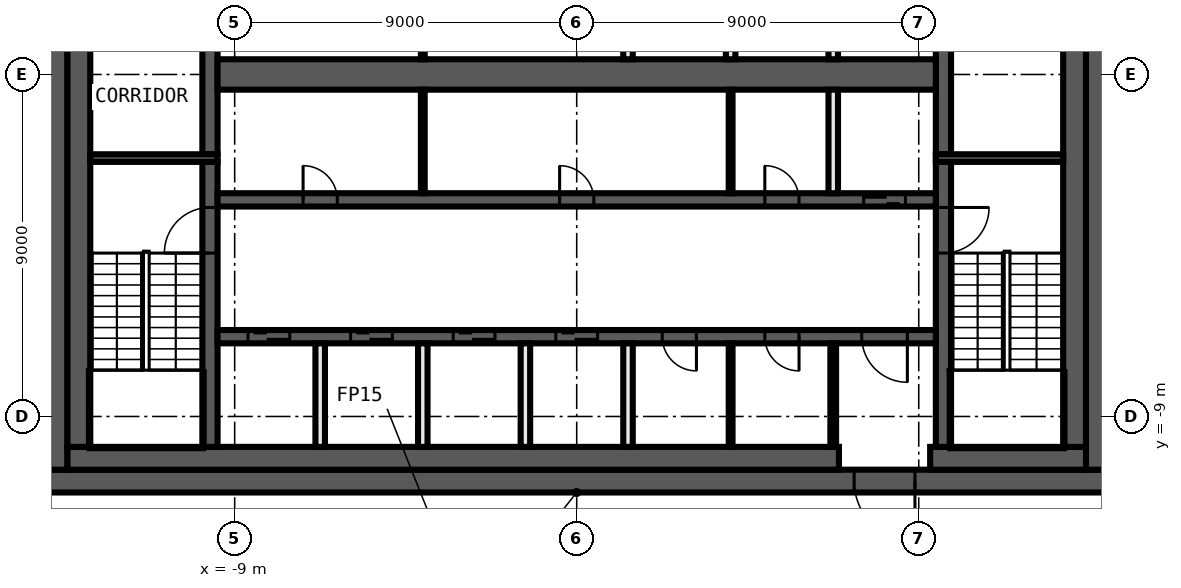
"""IFC4 building model, lengths in metres.
Left out: names, types, materials, properties, quantities, classifications, styles, units other than length and angle.
Written with IfcOpenShell. Run it as: python <this file> out.ifc"""

import sys

from ifc_helpers import new_model, si_unit, direction, frame, frame_2d, origin, place, context, subcontext, project, spatial, rectangle, extrude, element, fill, save


model = new_model("IFC4")
c1 = context("Model", 3, precision=1e-05, world=origin(), true_north=direction((0.0, 1.0)))
c2 = subcontext(c1, "Body", "Model", "MODEL_VIEW")
j1 = project(units=[si_unit("LENGTHUNIT", "METRE"), si_unit("PLANEANGLEUNIT", "RADIAN")], contexts=[c1])
p1 = place(None, origin())
s1 = spatial("IfcSite", under=j1, at=p1, CompositionType="ELEMENT")
p2 = place(p1, origin())
s2 = spatial("IfcBuilding", under=s1, at=p2, CompositionType="ELEMENT")
p3 = place(p2, frame((0.0, 0.0, 348.8)))
s3 = spatial("IfcBuildingStorey", under=s2, at=p3, CompositionType="ELEMENT", Elevation=348.8)
p4 = place(p3, frame((14.0, -10.7, 0.0), z_axis=(0.0, 0.0, 1.0), x_axis=(-1.0, 0.0, 0.0)))
e1 = element("IfcWall", 1, at=p4, inside=s3, PredefinedType="SHEAR", context=c2, shape_type="SweptSolid", body=[
    extrude(rectangle(XDim=28.0, YDim=0.6, at=frame_2d((14.0, 0.0))), origin(), (0.0, 0.0, 1.0), 3.7),
])
p5 = place(p4, frame((5.1, 0.0, 0.0)))
e2 = element("IfcOpeningElement", 2, at=p5, cuts=e1, PredefinedType="OPENING", context=c2, shape_type="SweptSolid", body=[
    extrude(rectangle(XDim=1.6, YDim=2.1, at=frame_2d((0.8, 1.05))), frame((0.0, 0.31, 0.0), z_axis=(0.0, -1.0, 0.0), x_axis=(1.0, 0.0, 0.0)), (0.0, 0.0, 1.0), 0.62),
])
for number, where, z_axis, x_axis in (
    (3, (13.7, 10.4, 0.0), (0.0, 0.0, 1.0), (0.0, -1.0, 0.0)),
    (4, (-13.7, -10.4, 0.0), (0.0, 0.0, 1.0), (0.0, 1.0, 0.0)),
):
    element("IfcWall", number, at=place(p3, frame(where, z_axis=z_axis, x_axis=x_axis)), inside=s3, PredefinedType="SHEAR", context=c2, shape_type="SweptSolid", body=[
        extrude(rectangle(XDim=20.8, YDim=0.6, at=frame_2d((10.4, 0.0))), origin(), (0.0, 0.0, 1.0), 3.7),
    ])
p6 = place(p3, frame((13.4, -10.1, 0.0), z_axis=(0.0, 0.0, 1.0), x_axis=(-1.0, 0.0, 0.0)))
e5 = element("IfcWall", 5, at=p6, inside=s3, PredefinedType="SHEAR", context=c2, shape_type="SweptSolid", body=[
    extrude(rectangle(XDim=4.1, YDim=0.6, at=frame_2d((2.05, 0.0))), origin(), (0.0, 0.0, 1.0), 3.7),
])
p7 = place(p3, frame((6.9, -10.1, 0.0), z_axis=(0.0, 0.0, 1.0), x_axis=(-1.0, 0.0, 0.0)))
e6 = element("IfcWall", 6, at=p7, inside=s3, PredefinedType="SHEAR", context=c2, shape_type="SweptSolid", body=[
    extrude(rectangle(XDim=20.3, YDim=0.6, at=frame_2d((10.15, 0.0))), origin(), (0.0, 0.0, 1.0), 3.7),
])
for number, where, z_axis, x_axis in (
    (7, (13.1, 9.8, 0.0), (0.0, 0.0, 1.0), (0.0, -1.0, 0.0)),
    (8, (-13.1, -9.8, 0.0), (0.0, 0.0, 1.0), (0.0, 1.0, 0.0)),
):
    element("IfcWall", number, at=place(p3, frame(where, z_axis=z_axis, x_axis=x_axis)), inside=s3, PredefinedType="SHEAR", context=c2, shape_type="SweptSolid", body=[
        extrude(rectangle(XDim=19.6, YDim=0.6, at=frame_2d((9.8, 0.0))), origin(), (0.0, 0.0, 1.0), 3.7),
    ])
p8 = place(p3, frame((9.65, -2.3, 0.0), z_axis=(0.0, 0.0, 1.0), x_axis=(0.0, -1.0, 0.0)))
e9 = element("IfcWall", 9, at=p8, inside=s3, PredefinedType="SHEAR", context=c2, shape_type="SweptSolid", body=[
    extrude(rectangle(XDim=7.5, YDim=0.4, at=frame_2d((3.75, 0.0))), origin(), (0.0, 0.0, 1.0), 3.7),
])
p9 = place(p8, frame((1.2, 0.0, 0.0)))
e10 = element("IfcOpeningElement", 10, at=p9, cuts=e9, PredefinedType="OPENING", context=c2, shape_type="SweptSolid", body=[
    extrude(rectangle(XDim=1.2, YDim=2.1, at=frame_2d((0.6, 1.05))), frame((0.0, 0.21, 0.0), z_axis=(0.0, -1.0, 0.0), x_axis=(1.0, 0.0, 0.0)), (0.0, 0.0, 1.0), 0.42),
])
p10 = place(p3, frame((9.65, 2.1, 0.0), z_axis=(0.0, 0.0, 1.0), x_axis=(0.0, -1.0, 0.0)))
e11 = element("IfcWall", 11, at=p10, inside=s3, PredefinedType="SHEAR", context=c2, shape_type="SweptSolid", body=[
    extrude(rectangle(XDim=4.2, YDim=0.4, at=frame_2d((2.1, 0.0))), origin(), (0.0, 0.0, 1.0), 3.7),
])
p11 = place(p10, frame((0.15, 0.0, 0.0)))
e12 = element("IfcOpeningElement", 12, at=p11, cuts=e11, PredefinedType="OPENING", context=c2, shape_type="SweptSolid", body=[
    extrude(rectangle(XDim=0.9, YDim=2.1, at=frame_2d((0.45, 1.05))), frame((0.0, 0.21, 0.0), z_axis=(0.0, -1.0, 0.0), x_axis=(1.0, 0.0, 0.0)), (0.0, 0.0, 1.0), 0.42),
])
p12 = place(p3, frame((-9.65, -9.8, 0.0), z_axis=(0.0, 0.0, 1.0), x_axis=(0.0, 1.0, 0.0)))
e13 = element("IfcWall", 13, at=p12, inside=s3, PredefinedType="SHEAR", context=c2, shape_type="SweptSolid", body=[
    extrude(rectangle(XDim=7.5, YDim=0.4, at=frame_2d((3.75, 0.0))), origin(), (0.0, 0.0, 1.0), 3.7),
])
p13 = place(p12, frame((5.1, 0.0, 0.0)))
e14 = element("IfcOpeningElement", 14, at=p13, cuts=e13, PredefinedType="OPENING", context=c2, shape_type="SweptSolid", body=[
    extrude(rectangle(XDim=1.2, YDim=2.1, at=frame_2d((0.6, 1.05))), frame((0.0, 0.21, 0.0), z_axis=(0.0, -1.0, 0.0), x_axis=(1.0, 0.0, 0.0)), (0.0, 0.0, 1.0), 0.42),
])
p14 = place(p3, frame((-9.65, -2.1, 0.0), z_axis=(0.0, 0.0, 1.0), x_axis=(0.0, 1.0, 0.0)))
e15 = element("IfcWall", 15, at=p14, inside=s3, PredefinedType="SHEAR", context=c2, shape_type="SweptSolid", body=[
    extrude(rectangle(XDim=4.2, YDim=0.4, at=frame_2d((2.1, 0.0))), origin(), (0.0, 0.0, 1.0), 3.7),
])
for number, where, z_axis, x_axis in (
    (16, (9.45, -2.2, 0.0), (0.0, 0.0, 1.0), (1.0, 0.0, 0.0)),
    (17, (-9.45, -2.2, 0.0), (0.0, 0.0, 1.0), (-1.0, 0.0, 0.0)),
):
    element("IfcWall", number, at=place(p3, frame(where, z_axis=z_axis, x_axis=x_axis)), inside=s3, PredefinedType="SHEAR", context=c2, shape_type="SweptSolid", body=[
        extrude(rectangle(XDim=3.35, YDim=0.2, at=frame_2d((1.675, 0.0))), origin(), (0.0, 0.0, 1.0), 3.7),
    ])
p15 = place(p3, frame((-9.45, -3.3, 0.0), z_axis=(0.0, 0.0, 1.0), x_axis=(1.0, 0.0, 0.0)))
e18 = element("IfcWall", 18, at=p15, inside=s3, PredefinedType="SHEAR", context=c2, shape_type="SweptSolid", body=[
    extrude(rectangle(XDim=18.9, YDim=0.35, at=frame_2d((9.45, 0.0))), origin(), (0.0, 0.0, 1.0), 3.7),
])
p16 = place(p15, frame((17.0, 0.0, 0.0)))
e19 = element("IfcOpeningElement", 19, at=p16, cuts=e18, PredefinedType="OPENING", context=c2, shape_type="SweptSolid", body=[
    extrude(rectangle(XDim=1.1, YDim=2.1, at=frame_2d((0.55, 1.05))), frame((0.0, 0.185, 0.0), z_axis=(0.0, -1.0, 0.0), x_axis=(1.0, 0.0, 0.0)), (0.0, 0.0, 1.0), 0.37),
])
p17 = place(p15, frame((2.25, 0.0, 0.0)))
e20 = element("IfcOpeningElement", 20, at=p17, cuts=e18, PredefinedType="OPENING", context=c2, shape_type="SweptSolid", body=[
    extrude(rectangle(XDim=0.9, YDim=2.1, at=frame_2d((0.45, 1.05))), frame((0.0, 0.185, 0.0), z_axis=(0.0, -1.0, 0.0), x_axis=(1.0, 0.0, 0.0)), (0.0, 0.0, 1.0), 0.37),
])
p18 = place(p15, frame((9.0, 0.0, 0.0)))
e21 = element("IfcOpeningElement", 21, at=p18, cuts=e18, PredefinedType="OPENING", context=c2, shape_type="SweptSolid", body=[
    extrude(rectangle(XDim=0.9, YDim=2.1, at=frame_2d((0.45, 1.05))), frame((0.0, 0.185, 0.0), z_axis=(0.0, -1.0, 0.0), x_axis=(1.0, 0.0, 0.0)), (0.0, 0.0, 1.0), 0.37),
])
p19 = place(p15, frame((14.4, 0.0, 0.0)))
e22 = element("IfcOpeningElement", 22, at=p19, cuts=e18, PredefinedType="OPENING", context=c2, shape_type="SweptSolid", body=[
    extrude(rectangle(XDim=0.9, YDim=2.1, at=frame_2d((0.45, 1.05))), frame((0.0, 0.185, 0.0), z_axis=(0.0, -1.0, 0.0), x_axis=(1.0, 0.0, 0.0)), (0.0, 0.0, 1.0), 0.37),
])
p20 = place(p3, frame((9.45, -6.9, 0.0), z_axis=(0.0, 0.0, 1.0), x_axis=(-1.0, 0.0, 0.0)))
e23 = element("IfcWall", 23, at=p20, inside=s3, PredefinedType="SHEAR", context=c2, shape_type="SweptSolid", body=[
    extrude(rectangle(XDim=18.9, YDim=0.35, at=frame_2d((9.45, 0.0))), origin(), (0.0, 0.0, 1.0), 3.7),
])
p21 = place(p20, frame((17.0, 0.0, 0.0)))
e24 = element("IfcOpeningElement", 24, at=p21, cuts=e23, PredefinedType="OPENING", context=c2, shape_type="SweptSolid", body=[
    extrude(rectangle(XDim=1.1, YDim=2.1, at=frame_2d((0.55, 1.05))), frame((0.0, 0.185, 0.0), z_axis=(0.0, -1.0, 0.0), x_axis=(1.0, 0.0, 0.0)), (0.0, 0.0, 1.0), 0.37),
])
p22 = place(p20, frame((14.3, 0.0, 0.0)))
e25 = element("IfcOpeningElement", 25, at=p22, cuts=e23, PredefinedType="OPENING", context=c2, shape_type="SweptSolid", body=[
    extrude(rectangle(XDim=1.1, YDim=2.1, at=frame_2d((0.55, 1.05))), frame((0.0, 0.185, 0.0), z_axis=(0.0, -1.0, 0.0), x_axis=(1.0, 0.0, 0.0)), (0.0, 0.0, 1.0), 0.37),
])
p23 = place(p20, frame((11.6, 0.0, 0.0)))
e26 = element("IfcOpeningElement", 26, at=p23, cuts=e23, PredefinedType="OPENING", context=c2, shape_type="SweptSolid", body=[
    extrude(rectangle(XDim=1.1, YDim=2.1, at=frame_2d((0.55, 1.05))), frame((0.0, 0.185, 0.0), z_axis=(0.0, -1.0, 0.0), x_axis=(1.0, 0.0, 0.0)), (0.0, 0.0, 1.0), 0.37),
])
p24 = place(p20, frame((8.9, 0.0, 0.0)))
e27 = element("IfcOpeningElement", 27, at=p24, cuts=e23, PredefinedType="OPENING", context=c2, shape_type="SweptSolid", body=[
    extrude(rectangle(XDim=1.1, YDim=2.1, at=frame_2d((0.55, 1.05))), frame((0.0, 0.185, 0.0), z_axis=(0.0, -1.0, 0.0), x_axis=(1.0, 0.0, 0.0)), (0.0, 0.0, 1.0), 0.37),
])
p25 = place(p20, frame((0.75, 0.0, 0.0)))
e28 = element("IfcOpeningElement", 28, at=p25, cuts=e23, PredefinedType="OPENING", context=c2, shape_type="SweptSolid", body=[
    extrude(rectangle(XDim=1.2, YDim=2.1, at=frame_2d((0.6, 1.05))), frame((0.0, 0.185, 0.0), z_axis=(0.0, -1.0, 0.0), x_axis=(1.0, 0.0, 0.0)), (0.0, 0.0, 1.0), 0.37),
])
p26 = place(p20, frame((6.3, 0.0, 0.0)))
e29 = element("IfcOpeningElement", 29, at=p26, cuts=e23, PredefinedType="OPENING", context=c2, shape_type="SweptSolid", body=[
    extrude(rectangle(XDim=0.9, YDim=2.1, at=frame_2d((0.45, 1.05))), frame((0.0, 0.185, 0.0), z_axis=(0.0, -1.0, 0.0), x_axis=(1.0, 0.0, 0.0)), (0.0, 0.0, 1.0), 0.37),
])
p27 = place(p20, frame((3.6, 0.0, 0.0)))
e30 = element("IfcOpeningElement", 30, at=p27, cuts=e23, PredefinedType="OPENING", context=c2, shape_type="SweptSolid", body=[
    extrude(rectangle(XDim=0.9, YDim=2.1, at=frame_2d((0.45, 1.05))), frame((0.0, 0.185, 0.0), z_axis=(0.0, -1.0, 0.0), x_axis=(1.0, 0.0, 0.0)), (0.0, 0.0, 1.0), 0.37),
])
p28 = place(p3, frame((-9.45, 0.0, 0.0), z_axis=(0.0, 0.0, 1.0), x_axis=(1.0, 0.0, 0.0)))
e31 = element("IfcWall", 31, at=p28, inside=s3, PredefinedType="SHEAR", context=c2, shape_type="SweptSolid", body=[
    extrude(rectangle(XDim=18.9, YDim=0.8, at=frame_2d((9.45, 0.0))), origin(), (0.0, 0.0, 1.0), 3.7),
])
p29 = place(p3, frame((6.75, -9.8, 0.0), z_axis=(0.0, 0.0, 1.0), x_axis=(0.0, 1.0, 0.0)))
e32 = element("IfcWall", 32, at=p29, inside=s3, PredefinedType="PARTITIONING", context=c2, shape_type="SweptSolid", body=[
    extrude(rectangle(XDim=2.725, YDim=0.15, at=frame_2d((1.363, 0.0))), origin(), (0.0, 0.0, 1.0), 3.7),
])
for number, where, z_axis, x_axis in (
    (33, (6.75, -3.125, 0.0), (0.0, 0.0, 1.0), (0.0, 1.0, 0.0)),
    (34, (6.75, 0.4, 0.0), (0.0, 0.0, 1.0), (0.0, 1.0, 0.0)),
):
    element("IfcWall", number, at=place(p3, frame(where, z_axis=z_axis, x_axis=x_axis)), inside=s3, PredefinedType="SOLIDWALL", context=c2, shape_type="SweptSolid", body=[
        extrude(rectangle(XDim=2.725, YDim=0.25, at=frame_2d((1.363, 0.0))), origin(), (0.0, 0.0, 1.0), 3.7),
    ])
for number, where, z_axis, x_axis in (
    (35, (4.05, -9.8, 0.0), (0.0, 0.0, 1.0), (0.0, 1.0, 0.0)),
    (36, (4.05, -3.125, 0.0), (0.0, 0.0, 1.0), (0.0, 1.0, 0.0)),
):
    element("IfcWall", number, at=place(p3, frame(where, z_axis=z_axis, x_axis=x_axis)), inside=s3, PredefinedType="PARTITIONING", context=c2, shape_type="SweptSolid", body=[
        extrude(rectangle(XDim=2.725, YDim=0.1, at=frame_2d((1.363, 0.0))), origin(), (0.0, 0.0, 1.0), 3.7),
    ])
for number, where, z_axis, x_axis in (
    (37, (4.05, 0.4, 0.0), (0.0, 0.0, 1.0), (0.0, 1.0, 0.0)),
    (38, (1.35, -9.8, 0.0), (0.0, 0.0, 1.0), (0.0, 1.0, 0.0)),
    (39, (1.35, 0.4, 0.0), (0.0, 0.0, 1.0), (0.0, 1.0, 0.0)),
    (40, (-1.35, -9.8, 0.0), (0.0, 0.0, 1.0), (0.0, 1.0, 0.0)),
):
    element("IfcWall", number, at=place(p3, frame(where, z_axis=z_axis, x_axis=x_axis)), inside=s3, PredefinedType="SOLIDWALL", context=c2, shape_type="SweptSolid", body=[
        extrude(rectangle(XDim=2.725, YDim=0.25, at=frame_2d((1.363, 0.0))), origin(), (0.0, 0.0, 1.0), 3.7),
    ])
for number, where, z_axis, x_axis in (
    (41, (-4.05, -3.125, 0.0), (0.0, 0.0, 1.0), (0.0, 1.0, 0.0)),
    (42, (-4.05, 0.4, 0.0), (0.0, 0.0, 1.0), (0.0, 1.0, 0.0)),
):
    element("IfcWall", number, at=place(p3, frame(where, z_axis=z_axis, x_axis=x_axis)), inside=s3, PredefinedType="PARTITIONING", context=c2, shape_type="SweptSolid", body=[
        extrude(rectangle(XDim=2.725, YDim=0.1, at=frame_2d((1.363, 0.0))), origin(), (0.0, 0.0, 1.0), 3.7),
    ])
for number, where, z_axis, x_axis in (
    (43, (-4.05, -9.8, 0.0), (0.0, 0.0, 1.0), (0.0, 1.0, 0.0)),
    (44, (-6.75, -9.8, 0.0), (0.0, 0.0, 1.0), (0.0, 1.0, 0.0)),
):
    element("IfcWall", number, at=place(p3, frame(where, z_axis=z_axis, x_axis=x_axis)), inside=s3, PredefinedType="SOLIDWALL", context=c2, shape_type="SweptSolid", body=[
        extrude(rectangle(XDim=2.725, YDim=0.25, at=frame_2d((1.363, 0.0))), origin(), (0.0, 0.0, 1.0), 3.7),
    ])
p30 = place(p16, origin())
e45 = element("IfcDoor", 45, at=p30, inside=s3, OperationType="DOUBLE_DOOR_SLIDING", PredefinedType="DOOR", context=c2, shape_type="SweptSolid", body=[
    extrude(rectangle(XDim=1.1, YDim=2.1, at=frame_2d((0.55, 1.05))), frame((0.0, 0.025, 0.0), z_axis=(0.0, -1.0, 0.0), x_axis=(1.0, 0.0, 0.0)), (0.0, 0.0, 1.0), 0.05),
])
fill(e19, e45)
p31 = place(p21, origin())
e46 = element("IfcDoor", 46, at=p31, inside=s3, OperationType="DOUBLE_DOOR_SLIDING", PredefinedType="DOOR", context=c2, shape_type="SweptSolid", body=[
    extrude(rectangle(XDim=1.1, YDim=2.1, at=frame_2d((0.55, 1.05))), frame((0.0, 0.025, 0.0), z_axis=(0.0, -1.0, 0.0), x_axis=(1.0, 0.0, 0.0)), (0.0, 0.0, 1.0), 0.05),
])
fill(e24, e46)
p32 = place(p22, origin())
e47 = element("IfcDoor", 47, at=p32, inside=s3, OperationType="DOUBLE_DOOR_SLIDING", PredefinedType="DOOR", context=c2, shape_type="SweptSolid", body=[
    extrude(rectangle(XDim=1.1, YDim=2.1, at=frame_2d((0.55, 1.05))), frame((0.0, 0.025, 0.0), z_axis=(0.0, -1.0, 0.0), x_axis=(1.0, 0.0, 0.0)), (0.0, 0.0, 1.0), 0.05),
])
fill(e25, e47)
p33 = place(p23, origin())
e48 = element("IfcDoor", 48, at=p33, inside=s3, OperationType="DOUBLE_DOOR_SLIDING", PredefinedType="DOOR", context=c2, shape_type="SweptSolid", body=[
    extrude(rectangle(XDim=1.1, YDim=2.1, at=frame_2d((0.55, 1.05))), frame((0.0, 0.025, 0.0), z_axis=(0.0, -1.0, 0.0), x_axis=(1.0, 0.0, 0.0)), (0.0, 0.0, 1.0), 0.05),
])
fill(e26, e48)
p34 = place(p24, origin())
e49 = element("IfcDoor", 49, at=p34, inside=s3, OperationType="DOUBLE_DOOR_SLIDING", PredefinedType="DOOR", context=c2, shape_type="SweptSolid", body=[
    extrude(rectangle(XDim=1.1, YDim=2.1, at=frame_2d((0.55, 1.05))), frame((0.0, 0.025, 0.0), z_axis=(0.0, -1.0, 0.0), x_axis=(1.0, 0.0, 0.0)), (0.0, 0.0, 1.0), 0.05),
])
fill(e27, e49)
p35 = place(p5, origin())
e50 = element("IfcDoor", 50, at=p35, inside=s3, OperationType="DOUBLE_DOOR_SINGLE_SWING", PredefinedType="DOOR", context=c2, shape_type="SweptSolid", body=[
    extrude(rectangle(XDim=1.6, YDim=2.1, at=frame_2d((0.8, 1.05))), frame((0.0, 0.025, 0.0), z_axis=(0.0, -1.0, 0.0), x_axis=(1.0, 0.0, 0.0)), (0.0, 0.0, 1.0), 0.05),
])
fill(e2, e50)
p36 = place(p25, origin())
e51 = element("IfcDoor", 51, at=p36, inside=s3, OperationType="SINGLE_SWING_LEFT", PredefinedType="DOOR", context=c2, shape_type="SweptSolid", body=[
    extrude(rectangle(XDim=1.2, YDim=2.1, at=frame_2d((0.6, 1.05))), frame((0.0, 0.025, 0.0), z_axis=(0.0, -1.0, 0.0), x_axis=(1.0, 0.0, 0.0)), (0.0, 0.0, 1.0), 0.05),
])
fill(e28, e51)
p37 = place(p17, origin())
e52 = element("IfcDoor", 52, at=p37, inside=s3, OperationType="SINGLE_SWING_LEFT", PredefinedType="DOOR", context=c2, shape_type="SweptSolid", body=[
    extrude(rectangle(XDim=0.9, YDim=2.1, at=frame_2d((0.45, 1.05))), frame((0.0, 0.025, 0.0), z_axis=(0.0, -1.0, 0.0), x_axis=(1.0, 0.0, 0.0)), (0.0, 0.0, 1.0), 0.05),
])
fill(e20, e52)
p38 = place(p18, origin())
e53 = element("IfcDoor", 53, at=p38, inside=s3, OperationType="SINGLE_SWING_RIGHT", PredefinedType="DOOR", context=c2, shape_type="SweptSolid", body=[
    extrude(rectangle(XDim=0.9, YDim=2.1, at=frame_2d((0.45, 1.05))), frame((0.0, 0.025, 0.0), z_axis=(0.0, -1.0, 0.0), x_axis=(1.0, 0.0, 0.0)), (0.0, 0.0, 1.0), 0.05),
])
fill(e21, e53)
p39 = place(p19, origin())
e54 = element("IfcDoor", 54, at=p39, inside=s3, OperationType="SINGLE_SWING_LEFT", PredefinedType="DOOR", context=c2, shape_type="SweptSolid", body=[
    extrude(rectangle(XDim=0.9, YDim=2.1, at=frame_2d((0.45, 1.05))), frame((0.0, 0.025, 0.0), z_axis=(0.0, -1.0, 0.0), x_axis=(1.0, 0.0, 0.0)), (0.0, 0.0, 1.0), 0.05),
])
fill(e22, e54)
p40 = place(p26, origin())
e55 = element("IfcDoor", 55, at=p40, inside=s3, OperationType="SINGLE_SWING_RIGHT", PredefinedType="DOOR", context=c2, shape_type="SweptSolid", body=[
    extrude(rectangle(XDim=0.9, YDim=2.1, at=frame_2d((0.45, 1.05))), frame((0.0, 0.025, 0.0), z_axis=(0.0, -1.0, 0.0), x_axis=(1.0, 0.0, 0.0)), (0.0, 0.0, 1.0), 0.05),
])
fill(e29, e55)
p41 = place(p27, origin())
e56 = element("IfcDoor", 56, at=p41, inside=s3, OperationType="SINGLE_SWING_LEFT", PredefinedType="DOOR", context=c2, shape_type="SweptSolid", body=[
    extrude(rectangle(XDim=0.9, YDim=2.1, at=frame_2d((0.45, 1.05))), frame((0.0, 0.025, 0.0), z_axis=(0.0, -1.0, 0.0), x_axis=(1.0, 0.0, 0.0)), (0.0, 0.0, 1.0), 0.05),
])
fill(e30, e56)
p42 = place(p9, origin())
e57 = element("IfcDoor", 57, at=p42, inside=s3, OperationType="SINGLE_SWING_RIGHT", PredefinedType="DOOR", context=c2, shape_type="SweptSolid", body=[
    extrude(rectangle(XDim=1.2, YDim=2.1, at=frame_2d((0.6, 1.05))), frame((0.0, 0.025, 0.0), z_axis=(0.0, -1.0, 0.0), x_axis=(1.0, 0.0, 0.0)), (0.0, 0.0, 1.0), 0.05),
])
fill(e10, e57)
p43 = place(p13, origin())
e58 = element("IfcDoor", 58, at=p43, inside=s3, OperationType="SINGLE_SWING_LEFT", PredefinedType="DOOR", context=c2, shape_type="SweptSolid", body=[
    extrude(rectangle(XDim=1.2, YDim=2.1, at=frame_2d((0.6, 1.05))), frame((0.0, 0.025, 0.0), z_axis=(0.0, -1.0, 0.0), x_axis=(1.0, 0.0, 0.0)), (0.0, 0.0, 1.0), 0.05),
])
fill(e14, e58)
save(model, sys.argv[1])
